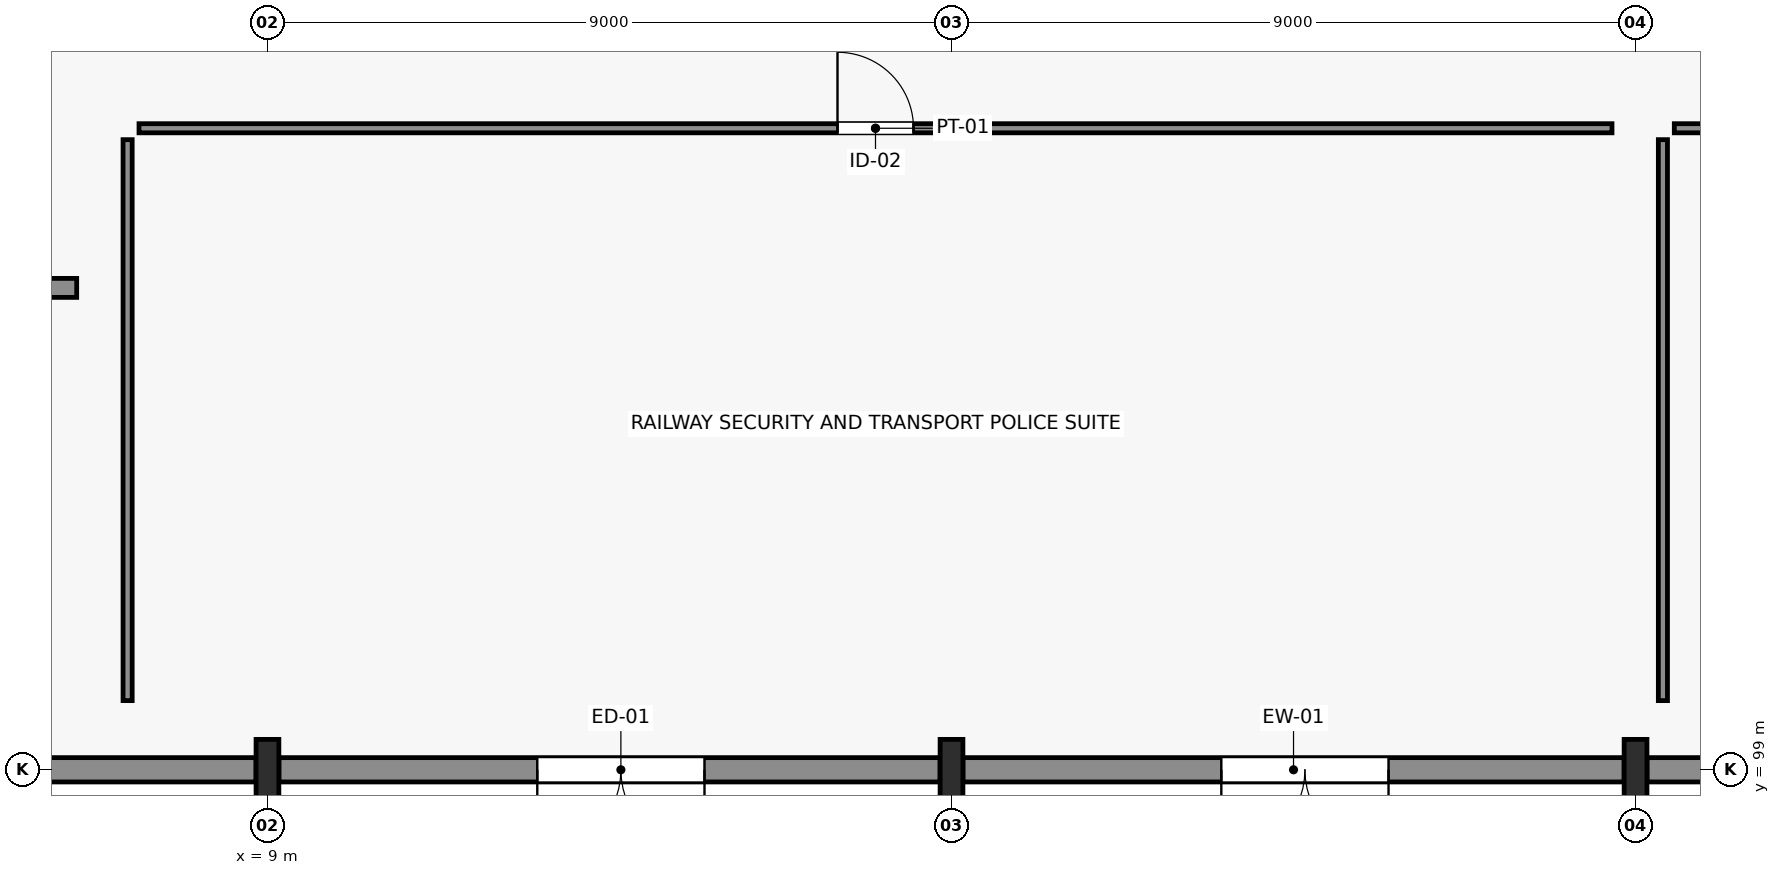
"""IFC4 building model, lengths in metres.
Left out: names, types, materials, properties, quantities, classifications, styles, units other than length and angle.
Written with IfcOpenShell. Run it as: python <this file> out.ifc"""

import sys

from ifc_helpers import new_model, si_unit, direction, frame, frame_2d, origin, origin_2d, place, context, subcontext, project, spatial, rectangle, i_section, extrude, element, fill, save


model = new_model("IFC4")
c1 = context("Model", 3, precision=1e-05, world=origin(), true_north=direction((0.0, 1.0)))
c2 = subcontext(c1, "Body", "Model", "MODEL_VIEW")
j1 = project(units=[si_unit("LENGTHUNIT", "METRE"), si_unit("PLANEANGLEUNIT", "RADIAN")], contexts=[c1])
p1 = place(None, origin())
s1 = spatial("IfcSite", under=j1, at=p1, CompositionType="ELEMENT")
p2 = place(p1, origin())
s2 = spatial("IfcBuilding", under=s1, at=p2, CompositionType="ELEMENT")
p3 = place(p2, origin())
s3 = spatial("IfcBuildingStorey", under=s2, at=p3, CompositionType="ELEMENT", Elevation=0.0)
for number, where, z_axis, x_axis in (
    (1, (9.0, 99.0, 0.0), (0.0, 0.0, 1.0), (1.0, 0.0, 0.0)),
    (2, (18.0, 99.0, 0.0), (0.0, 0.0, 1.0), (1.0, 0.0, 0.0)),
    (3, (27.0, 99.0, 0.0), (0.0, 0.0, 1.0), (1.0, 0.0, 0.0)),
):
    element("IfcColumn", number, at=place(p3, frame(where, z_axis=z_axis, x_axis=x_axis)), inside=s3, PredefinedType="COLUMN", context=c2, shape_type="SweptSolid", body=[
        extrude(i_section(OverallWidth=0.3, OverallDepth=0.8, WebThickness=0.018, FlangeThickness=0.033, FilletRadius=0.03, at=origin_2d()), origin(), (0.0, 0.0, 1.0), 4.61),
    ])
p4 = place(p3, frame((8.85, 99.0, 0.0), z_axis=(0.0, 0.0, 1.0), x_axis=(-1.0, 0.0, 0.0)))
e4 = element("IfcWall", 4, at=p4, inside=s3, PredefinedType="SOLIDWALL", context=c2, shape_type="SweptSolid", body=[
    extrude(rectangle(XDim=8.7, YDim=0.32, at=frame_2d((4.35, 0.0))), origin(), (0.0, 0.0, 1.0), 4.15),
])
p5 = place(p4, frame((3.1, 0.0, 0.0)))
e5 = element("IfcOpeningElement", 5, at=p5, cuts=e4, PredefinedType="OPENING", context=c2, shape_type="SweptSolid", body=[
    extrude(rectangle(XDim=2.2, YDim=2.4, at=frame_2d((1.1, 1.2))), frame((0.0, 0.17, 0.0), z_axis=(0.0, -1.0, 0.0), x_axis=(1.0, 0.0, 0.0)), (0.0, 0.0, 1.0), 0.34),
])
p6 = place(p3, frame((17.85, 99.0, 0.0), z_axis=(0.0, 0.0, 1.0), x_axis=(-1.0, 0.0, 0.0)))
e6 = element("IfcWall", 6, at=p6, inside=s3, PredefinedType="SOLIDWALL", context=c2, shape_type="SweptSolid", body=[
    extrude(rectangle(XDim=8.7, YDim=0.32, at=frame_2d((4.35, 0.0))), origin(), (0.0, 0.0, 1.0), 4.15),
])
p7 = place(p6, frame((3.1, 0.0, 0.0)))
e7 = element("IfcOpeningElement", 7, at=p7, cuts=e6, PredefinedType="OPENING", context=c2, shape_type="SweptSolid", body=[
    extrude(rectangle(XDim=2.2, YDim=2.4, at=frame_2d((1.1, 1.2))), frame((0.0, 0.17, 0.0), z_axis=(0.0, -1.0, 0.0), x_axis=(1.0, 0.0, 0.0)), (0.0, 0.0, 1.0), 0.34),
])
p8 = place(p3, frame((26.85, 99.0, 0.0), z_axis=(0.0, 0.0, 1.0), x_axis=(-1.0, 0.0, 0.0)))
e8 = element("IfcWall", 8, at=p8, inside=s3, PredefinedType="SOLIDWALL", context=c2, shape_type="SweptSolid", body=[
    extrude(rectangle(XDim=8.7, YDim=0.32, at=frame_2d((4.35, 0.0))), origin(), (0.0, 0.0, 1.0), 4.15),
])
p9 = place(p8, frame((3.1, 0.0, 0.0)))
e9 = element("IfcOpeningElement", 9, at=p9, cuts=e8, PredefinedType="OPENING", context=c2, shape_type="SweptSolid", body=[
    extrude(rectangle(XDim=2.2, YDim=2.4, at=frame_2d((1.1, 1.2))), frame((0.0, 0.17, 0.0), z_axis=(0.0, -1.0, 0.0), x_axis=(1.0, 0.0, 0.0)), (0.0, 0.0, 1.0), 0.34),
])
p10 = place(p3, frame((35.85, 99.0, 0.0), z_axis=(0.0, 0.0, 1.0), x_axis=(-1.0, 0.0, 0.0)))
e10 = element("IfcWall", 10, at=p10, inside=s3, PredefinedType="SOLIDWALL", context=c2, shape_type="SweptSolid", body=[
    extrude(rectangle(XDim=8.7, YDim=0.32, at=frame_2d((4.35, 0.0))), origin(), (0.0, 0.0, 1.0), 4.15),
])
p11 = place(p10, frame((1.8, 0.0, 1.05)))
e11 = element("IfcOpeningElement", 11, at=p11, cuts=e10, PredefinedType="OPENING", context=c2, shape_type="SweptSolid", body=[
    extrude(rectangle(XDim=2.7, YDim=1.8, at=frame_2d((1.35, 0.9))), frame((0.0, 0.17, 0.0), z_axis=(0.0, -1.0, 0.0), x_axis=(1.0, 0.0, 0.0)), (0.0, 0.0, 1.0), 0.34),
])
p12 = place(p10, frame((5.2, 0.0, 1.05)))
e12 = element("IfcOpeningElement", 12, at=p12, cuts=e10, PredefinedType="OPENING", context=c2, shape_type="SweptSolid", body=[
    extrude(rectangle(XDim=2.7, YDim=1.8, at=frame_2d((1.35, 0.9))), frame((0.0, 0.17, 0.0), z_axis=(0.0, -1.0, 0.0), x_axis=(1.0, 0.0, 0.0)), (0.0, 0.0, 1.0), 0.34),
])
p13 = place(p3, frame((0.81, 105.34, 0.0), z_axis=(0.0, 0.0, 1.0), x_axis=(1.0, 0.0, 0.0)))
e13 = element("IfcWall", 13, at=p13, inside=s3, PredefinedType="SOLIDWALL", context=c2, shape_type="SweptSolid", body=[
    extrude(rectangle(XDim=5.68, YDim=0.25, at=frame_2d((2.84, 0.0))), origin(), (0.0, 0.0, 1.0), 4.31),
])
p14 = place(p13, frame((2.14, 0.0, 0.0)))
e14 = element("IfcOpeningElement", 14, at=p14, cuts=e13, PredefinedType="OPENING", context=c2, shape_type="SweptSolid", body=[
    extrude(rectangle(XDim=1.4, YDim=2.3, at=frame_2d((0.7, 1.15))), frame((0.0, 0.135, 0.0), z_axis=(0.0, -1.0, 0.0), x_axis=(1.0, 0.0, 0.0)), (0.0, 0.0, 1.0), 0.27),
])
p15 = place(p3, frame((7.31, 107.44, 0.0), z_axis=(0.0, 0.0, 1.0), x_axis=(1.0, 0.0, 0.0)))
e15 = element("IfcWall", 15, at=p15, inside=s3, PredefinedType="PARTITIONING", context=c2, shape_type="SweptSolid", body=[
    extrude(rectangle(XDim=19.38, YDim=0.12, at=frame_2d((9.69, 0.0))), origin(), (0.0, 0.0, 1.0), 4.03),
])
p16 = place(p15, frame((9.19, 0.0, 0.0)))
e16 = element("IfcOpeningElement", 16, at=p16, cuts=e15, PredefinedType="OPENING", context=c2, shape_type="SweptSolid", body=[
    extrude(rectangle(XDim=1.0, YDim=2.15, at=frame_2d((0.5, 1.075))), frame((0.0, 0.07, 0.0), z_axis=(0.0, -1.0, 0.0), x_axis=(1.0, 0.0, 0.0)), (0.0, 0.0, 1.0), 0.14),
])
p17 = place(p3, frame((7.16, 99.91, 0.0), z_axis=(0.0, 0.0, 1.0), x_axis=(0.0, 1.0, 0.0)))
e17 = element("IfcWall", 17, at=p17, inside=s3, PredefinedType="PARTITIONING", context=c2, shape_type="SweptSolid", body=[
    extrude(rectangle(XDim=7.38, YDim=0.12, at=frame_2d((3.69, 0.0))), origin(), (0.0, 0.0, 1.0), 4.55),
])
p18 = place(p3, frame((27.51, 107.44, 0.0), z_axis=(0.0, 0.0, 1.0), x_axis=(1.0, 0.0, 0.0)))
e18 = element("IfcWall", 18, at=p18, inside=s3, PredefinedType="PARTITIONING", context=c2, shape_type="SweptSolid", body=[
    extrude(rectangle(XDim=43.68, YDim=0.12, at=frame_2d((21.84, 0.0))), origin(), (0.0, 0.0, 1.0), 4.03),
])
p19 = place(p18, frame((21.34, 0.0, 0.0)))
e19 = element("IfcOpeningElement", 19, at=p19, cuts=e18, PredefinedType="OPENING", context=c2, shape_type="SweptSolid", body=[
    extrude(rectangle(XDim=1.0, YDim=2.15, at=frame_2d((0.5, 1.075))), frame((0.0, 0.07, 0.0), z_axis=(0.0, -1.0, 0.0), x_axis=(1.0, 0.0, 0.0)), (0.0, 0.0, 1.0), 0.14),
])
p20 = place(p3, frame((27.36, 99.91, 0.0), z_axis=(0.0, 0.0, 1.0), x_axis=(0.0, 1.0, 0.0)))
e20 = element("IfcWall", 20, at=p20, inside=s3, PredefinedType="PARTITIONING", context=c2, shape_type="SweptSolid", body=[
    extrude(rectangle(XDim=7.38, YDim=0.12, at=frame_2d((3.69, 0.0))), origin(), (0.0, 0.0, 1.0), 4.55),
])
p21 = place(p7, origin())
e21 = element("IfcDoor", 21, at=p21, inside=s3, OperationType="DOUBLE_DOOR_SINGLE_SWING", PredefinedType="DOOR", context=c2, shape_type="SweptSolid", body=[
    extrude(rectangle(XDim=2.2, YDim=2.4, at=frame_2d((1.1, 1.2))), frame((0.0, 0.025, 0.0), z_axis=(0.0, -1.0, 0.0), x_axis=(1.0, 0.0, 0.0)), (0.0, 0.0, 1.0), 0.05),
])
fill(e7, e21)
p22 = place(p9, origin())
e22 = element("IfcDoor", 22, at=p22, inside=s3, OperationType="DOUBLE_DOOR_SINGLE_SWING", PredefinedType="DOOR", context=c2, shape_type="SweptSolid", body=[
    extrude(rectangle(XDim=2.2, YDim=2.4, at=frame_2d((1.1, 1.2))), frame((0.0, 0.025, 0.0), z_axis=(0.0, -1.0, 0.0), x_axis=(1.0, 0.0, 0.0)), (0.0, 0.0, 1.0), 0.05),
])
fill(e9, e22)
p23 = place(p16, origin())
e23 = element("IfcDoor", 23, at=p23, inside=s3, OperationType="SINGLE_SWING_LEFT", PredefinedType="DOOR", context=c2, shape_type="SweptSolid", body=[
    extrude(rectangle(XDim=1.0, YDim=2.15, at=frame_2d((0.5, 1.075))), frame((0.0, 0.025, 0.0), z_axis=(0.0, -1.0, 0.0), x_axis=(1.0, 0.0, 0.0)), (0.0, 0.0, 1.0), 0.05),
])
fill(e16, e23)
save(model, sys.argv[1])
